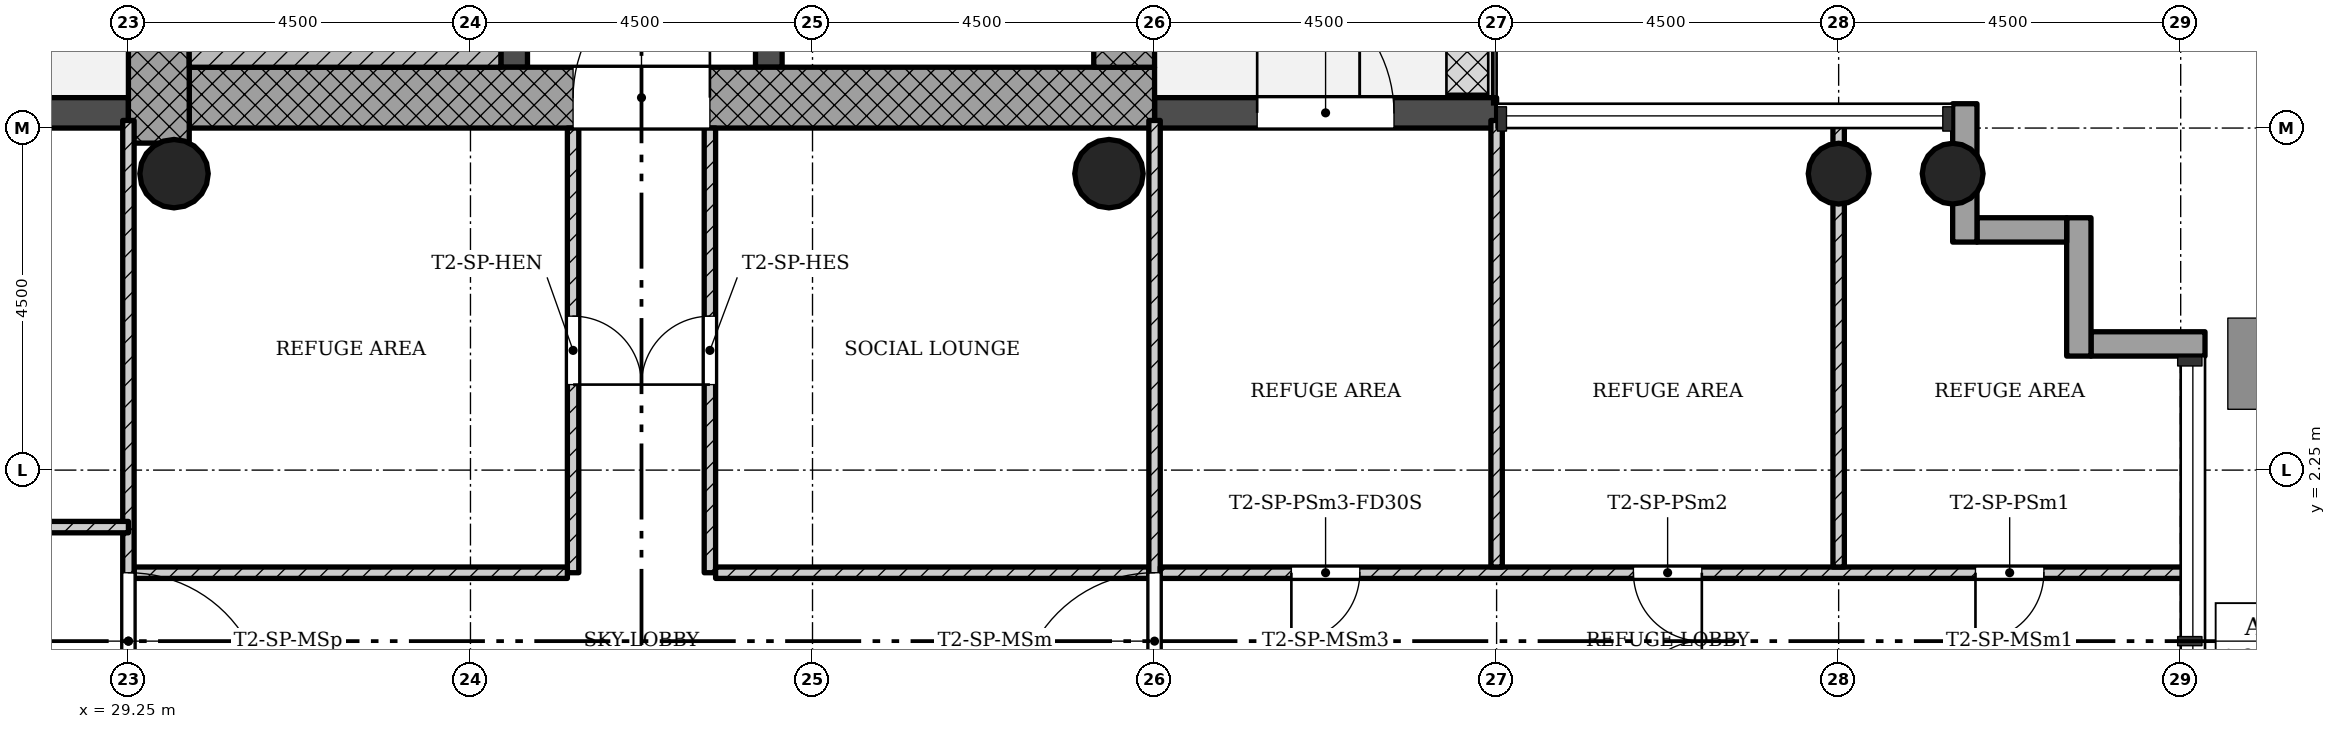
"""IFC4 building model, lengths in metres.
Left out: names, types, materials, properties, quantities, classifications, styles, units other than length and angle.
Written with IfcOpenShell. Run it as: python <this file> out.ifc"""

import sys

from ifc_helpers import new_model, si_unit, direction, frame, frame_2d, origin, origin_2d, place, context, subcontext, project, spatial, rectangle, hollow_circle, extrude, element, fill, save


model = new_model("IFC4")
c1 = context("Model", 3, precision=1e-05, world=origin(), true_north=direction((0.0, 1.0)))
c2 = subcontext(c1, "Body", "Model", "MODEL_VIEW")
j1 = project(units=[si_unit("LENGTHUNIT", "METRE"), si_unit("PLANEANGLEUNIT", "RADIAN")], contexts=[c1])
p1 = place(None, origin())
s1 = spatial("IfcSite", under=j1, at=p1, CompositionType="ELEMENT")
p2 = place(p1, origin())
s2 = spatial("IfcBuilding", under=s1, at=p2, CompositionType="ELEMENT")
p3 = place(p2, frame((0.0, 0.0, 128.7)))
s3 = spatial("IfcBuildingStorey", under=s2, at=p3, CompositionType="ELEMENT", Elevation=128.7)
p4 = place(p3, frame((30.05, 7.15, 0.0), z_axis=(0.0, 0.0, 1.0), x_axis=(1.0, 0.0, 0.0)))
e1 = element("IfcWall", 1, at=p4, inside=s3, PredefinedType="SHEAR", context=c2, shape_type="SweptSolid", body=[
    extrude(rectangle(XDim=12.7, YDim=0.8, at=frame_2d((6.35, 0.0))), origin(), (0.0, 0.0, 1.0), 5.0),
])
p5 = place(p4, frame((5.05, 0.0, 0.0)))
e2 = element("IfcOpeningElement", 2, at=p5, cuts=e1, PredefinedType="OPENING", context=c2, shape_type="SweptSolid", body=[
    extrude(rectangle(XDim=1.8, YDim=2.1, at=frame_2d((0.9, 1.05))), frame((0.0, 0.41, 0.0), z_axis=(0.0, -1.0, 0.0), x_axis=(1.0, 0.0, 0.0)), (0.0, 0.0, 1.0), 0.82),
])
p6 = place(p3, frame((42.35, 7.55, 0.0), z_axis=(0.0, 0.0, 1.0), x_axis=(0.0, 1.0, 0.0)))
e3 = element("IfcWall", 3, at=p6, inside=s3, PredefinedType="SHEAR", context=c2, shape_type="SweptSolid", body=[
    extrude(rectangle(XDim=8.2, YDim=0.8, at=frame_2d((4.1, 0.0))), origin(), (0.0, 0.0, 1.0), 5.0),
])
p7 = place(p3, frame((29.65, 15.348, 0.0), z_axis=(0.0, 0.0, 1.0), x_axis=(0.0, -1.0, 0.0)))
e4 = element("IfcWall", 4, at=p7, inside=s3, PredefinedType="SHEAR", context=c2, shape_type="SweptSolid", body=[
    extrude(rectangle(XDim=8.796, YDim=0.8, at=frame_2d((4.398, 0.0))), origin(), (0.0, 0.0, 1.0), 5.0),
])
p8 = place(p3, frame((34.325, 7.55, 0.0), z_axis=(0.0, 0.0, 1.0), x_axis=(0.0, 1.0, 0.0)))
e5 = element("IfcWall", 5, at=p8, inside=s3, PredefinedType="SHEAR", context=c2, shape_type="SweptSolid", body=[
    extrude(rectangle(XDim=7.4, YDim=0.35, at=frame_2d((3.7, 0.0))), origin(), (0.0, 0.0, 1.0), 5.0),
])
p9 = place(p8, frame((0.85, 0.0, 0.0)))
e6 = element("IfcOpeningElement", 6, at=p9, cuts=e5, PredefinedType="OPENING", context=c2, shape_type="SweptSolid", body=[
    extrude(rectangle(XDim=0.9, YDim=2.1, at=frame_2d((0.45, 1.05))), frame((0.0, 0.185, 0.0), z_axis=(0.0, -1.0, 0.0), x_axis=(1.0, 0.0, 0.0)), (0.0, 0.0, 1.0), 0.37),
])
p10 = place(p3, frame((37.675, 7.55, 0.0), z_axis=(0.0, 0.0, 1.0), x_axis=(0.0, 1.0, 0.0)))
e7 = element("IfcWall", 7, at=p10, inside=s3, PredefinedType="SHEAR", context=c2, shape_type="SweptSolid", body=[
    extrude(rectangle(XDim=7.4, YDim=0.35, at=frame_2d((3.7, 0.0))), origin(), (0.0, 0.0, 1.0), 5.0),
])
p11 = place(p10, frame((0.95, 0.0, 0.0)))
e8 = element("IfcOpeningElement", 8, at=p11, cuts=e7, PredefinedType="OPENING", context=c2, shape_type="SweptSolid", body=[
    extrude(rectangle(XDim=1.1, YDim=2.1, at=frame_2d((0.55, 1.05))), frame((0.0, 0.185, 0.0), z_axis=(0.0, -1.0, 0.0), x_axis=(1.0, 0.0, 0.0)), (0.0, 0.0, 1.0), 0.37),
])
p12 = place(p10, frame((3.15, 0.0, 0.0)))
e9 = element("IfcOpeningElement", 9, at=p12, cuts=e7, PredefinedType="OPENING", context=c2, shape_type="SweptSolid", body=[
    extrude(rectangle(XDim=1.1, YDim=2.1, at=frame_2d((0.55, 1.05))), frame((0.0, 0.185, 0.0), z_axis=(0.0, -1.0, 0.0), x_axis=(1.0, 0.0, 0.0)), (0.0, 0.0, 1.0), 0.37),
])
p13 = place(p10, frame((5.35, 0.0, 0.0)))
e10 = element("IfcOpeningElement", 10, at=p13, cuts=e7, PredefinedType="OPENING", context=c2, shape_type="SweptSolid", body=[
    extrude(rectangle(XDim=1.1, YDim=2.1, at=frame_2d((0.55, 1.05))), frame((0.0, 0.185, 0.0), z_axis=(0.0, -1.0, 0.0), x_axis=(1.0, 0.0, 0.0)), (0.0, 0.0, 1.0), 0.37),
])
for number, where, z_axis, x_axis in (
    (11, (51.75, 6.15, 0.0), (0.0, 0.0, 1.0), (1.0, 0.0, 0.0)),
    (12, (53.25, 6.15, 0.0), (0.0, 0.0, 1.0), (1.0, 0.0, 0.0)),
):
    element("IfcColumn", number, at=place(p3, frame(where, z_axis=z_axis, x_axis=x_axis)), inside=s3, PredefinedType="COLUMN", context=c2, shape_type="SweptSolid", body=[
        extrude(hollow_circle(Radius=0.4, WallThickness=0.028, at=origin_2d()), origin(), (0.0, 0.0, 1.0), 5.0),
    ])
for number, where, z_axis, x_axis in (
    (13, (42.15, 6.15, 0.0), (0.0, 0.0, 1.0), (1.0, 0.0, 0.0)),
    (14, (29.85, 6.15, 0.0), (0.0, 0.0, 1.0), (1.0, 0.0, 0.0)),
):
    element("IfcColumn", number, at=place(p3, frame(where, z_axis=z_axis, x_axis=x_axis)), inside=s3, PredefinedType="COLUMN", context=c2, shape_type="SweptSolid", body=[
        extrude(hollow_circle(Radius=0.45, WallThickness=0.032, at=origin_2d()), origin(), (0.0, 0.0, 1.0), 5.0),
    ])
p14 = place(p3, frame((56.57, 3.91, -0.3), z_axis=(0.0, 0.0, 1.0), x_axis=(-1.0, 0.0, 0.0)))
e15 = element("IfcWall", 15, at=p14, inside=s3, PredefinedType="STANDARD", context=c2, shape_type="SweptSolid", body=[
    extrude(rectangle(XDim=1.5, YDim=0.32, at=frame_2d((0.75, 0.0))), origin(), (0.0, 0.0, 1.0), 5.0),
])
p15 = place(p3, frame((54.91, 3.75, -0.3), z_axis=(0.0, 0.0, 1.0), x_axis=(0.0, 1.0, 0.0)))
e16 = element("IfcWall", 16, at=p15, inside=s3, PredefinedType="STANDARD", context=c2, shape_type="SweptSolid", body=[
    extrude(rectangle(XDim=1.82, YDim=0.32, at=frame_2d((0.91, 0.0))), origin(), (0.0, 0.0, 1.0), 5.0),
])
p16 = place(p3, frame((54.75, 5.41, -0.3), z_axis=(0.0, 0.0, 1.0), x_axis=(-1.0, 0.0, 0.0)))
e17 = element("IfcWall", 17, at=p16, inside=s3, PredefinedType="STANDARD", context=c2, shape_type="SweptSolid", body=[
    extrude(rectangle(XDim=1.18, YDim=0.32, at=frame_2d((0.59, 0.0))), origin(), (0.0, 0.0, 1.0), 5.0),
])
p17 = place(p3, frame((53.41, 5.25, -0.3), z_axis=(0.0, 0.0, 1.0), x_axis=(0.0, 1.0, 0.0)))
e18 = element("IfcWall", 18, at=p17, inside=s3, PredefinedType="STANDARD", context=c2, shape_type="SweptSolid", body=[
    extrude(rectangle(XDim=1.82, YDim=0.32, at=frame_2d((0.91, 0.0))), origin(), (0.0, 0.0, 1.0), 5.0),
])
p18 = place(p3, frame((47.25, 6.95, -0.02), z_axis=(0.0, 0.0, 1.0), x_axis=(-1.0, 0.0, 0.0)))
e19 = element("IfcWall", 19, at=p18, inside=s3, PredefinedType="STANDARD", context=c2, shape_type="SweptSolid", body=[
    extrude(rectangle(XDim=4.5, YDim=0.4, at=frame_2d((2.25, 0.0))), origin(), (0.0, 0.0, 1.0), 4.72),
])
p19 = place(p18, frame((1.35, 0.0, 0.02)))
e20 = element("IfcOpeningElement", 20, at=p19, cuts=e19, PredefinedType="OPENING", context=c2, shape_type="SweptSolid", body=[
    extrude(rectangle(XDim=1.8, YDim=2.1, at=frame_2d((0.9, 1.05))), frame((0.0, 0.21, 0.0), z_axis=(0.0, -1.0, 0.0), x_axis=(1.0, 0.0, 0.0)), (0.0, 0.0, 1.0), 0.42),
])
p20 = place(p3, frame((29.25, 6.95, -0.02), z_axis=(0.0, 0.0, 1.0), x_axis=(-1.0, 0.0, 0.0)))
e21 = element("IfcWall", 21, at=p20, inside=s3, PredefinedType="STANDARD", context=c2, shape_type="SweptSolid", body=[
    extrude(rectangle(XDim=4.5, YDim=0.4, at=frame_2d((2.25, 0.0))), origin(), (0.0, 0.0, 1.0), 4.72),
])
p21 = place(p20, frame((1.35, 0.0, 0.02)))
e22 = element("IfcOpeningElement", 22, at=p21, cuts=e21, PredefinedType="OPENING", context=c2, shape_type="SweptSolid", body=[
    extrude(rectangle(XDim=1.8, YDim=2.1, at=frame_2d((0.9, 1.05))), frame((0.0, 0.21, 0.0), z_axis=(0.0, -1.0, 0.0), x_axis=(1.0, 0.0, 0.0)), (0.0, 0.0, 1.0), 0.42),
])
p22 = place(p3, frame((35.1, 0.9, 0.0), z_axis=(0.0, 0.0, 1.0), x_axis=(0.0, 1.0, 0.0)))
e23 = element("IfcWall", 23, at=p22, inside=s3, PredefinedType="PARTITIONING", context=c2, shape_type="SweptSolid", body=[
    extrude(rectangle(XDim=5.85, YDim=0.15, at=frame_2d((2.925, 0.0))), origin(), (0.0, 0.0, 1.0), 4.58),
])
p23 = place(p22, frame((2.475, 0.0, 0.0)))
e24 = element("IfcOpeningElement", 24, at=p23, cuts=e23, PredefinedType="OPENING", context=c2, shape_type="SweptSolid", body=[
    extrude(rectangle(XDim=0.9, YDim=2.1, at=frame_2d((0.45, 1.05))), frame((0.0, 0.085, 0.0), z_axis=(0.0, -1.0, 0.0), x_axis=(1.0, 0.0, 0.0)), (0.0, 0.0, 1.0), 0.17),
])
p24 = place(p3, frame((35.025, 0.9, 0.0), z_axis=(0.0, 0.0, 1.0), x_axis=(-1.0, 0.0, 0.0)))
e25 = element("IfcWall", 25, at=p24, inside=s3, PredefinedType="PARTITIONING", context=c2, shape_type="SweptSolid", body=[
    extrude(rectangle(XDim=5.7, YDim=0.15, at=frame_2d((2.85, 0.0))), origin(), (0.0, 0.0, 1.0), 4.58),
])
p25 = place(p3, frame((36.9, 0.9, 0.0), z_axis=(0.0, 0.0, 1.0), x_axis=(0.0, 1.0, 0.0)))
e26 = element("IfcWall", 26, at=p25, inside=s3, PredefinedType="PARTITIONING", context=c2, shape_type="SweptSolid", body=[
    extrude(rectangle(XDim=5.85, YDim=0.15, at=frame_2d((2.925, 0.0))), origin(), (0.0, 0.0, 1.0), 4.58),
])
p26 = place(p25, frame((2.475, 0.0, 0.0)))
e27 = element("IfcOpeningElement", 27, at=p26, cuts=e26, PredefinedType="OPENING", context=c2, shape_type="SweptSolid", body=[
    extrude(rectangle(XDim=0.9, YDim=2.1, at=frame_2d((0.45, 1.05))), frame((0.0, 0.085, 0.0), z_axis=(0.0, -1.0, 0.0), x_axis=(1.0, 0.0, 0.0)), (0.0, 0.0, 1.0), 0.17),
])
p27 = place(p3, frame((42.675, 0.9, 0.0), z_axis=(0.0, 0.0, 1.0), x_axis=(-1.0, 0.0, 0.0)))
e28 = element("IfcWall", 28, at=p27, inside=s3, PredefinedType="PARTITIONING", context=c2, shape_type="SweptSolid", body=[
    extrude(rectangle(XDim=5.7, YDim=0.15, at=frame_2d((2.85, 0.0))), origin(), (0.0, 0.0, 1.0), 4.58),
])
p28 = place(p3, frame((29.25, -6.85, 0.0), z_axis=(0.0, 0.0, 1.0), x_axis=(0.0, 1.0, 0.0)))
e29 = element("IfcWall", 29, at=p28, inside=s3, PredefinedType="PARTITIONING", context=c2, shape_type="SweptSolid", body=[
    extrude(rectangle(XDim=13.7, YDim=0.15, at=frame_2d((6.85, 0.0))), origin(), (0.0, 0.0, 1.0), 4.58),
])
p29 = place(p28, frame((5.95, 0.0, 0.0)))
e30 = element("IfcOpeningElement", 30, at=p29, cuts=e29, PredefinedType="OPENING", context=c2, shape_type="SweptSolid", body=[
    extrude(rectangle(XDim=1.8, YDim=2.1, at=frame_2d((0.9, 1.05))), frame((0.0, 0.085, 0.0), z_axis=(0.0, -1.0, 0.0), x_axis=(1.0, 0.0, 0.0)), (0.0, 0.0, 1.0), 0.17),
])
p30 = place(p3, frame((29.25, 1.5, 0.0), z_axis=(0.0, 0.0, 1.0), x_axis=(-1.0, 0.0, 0.0)))
e31 = element("IfcWall", 31, at=p30, inside=s3, PredefinedType="PARTITIONING", context=c2, shape_type="SweptSolid", body=[
    extrude(rectangle(XDim=13.6, YDim=0.15, at=frame_2d((6.8, 0.0))), origin(), (0.0, 0.0, 1.0), 4.58),
])
p31 = place(p30, frame((1.8, 0.0, 0.0)))
e32 = element("IfcOpeningElement", 32, at=p31, cuts=e31, PredefinedType="OPENING", context=c2, shape_type="SweptSolid", body=[
    extrude(rectangle(XDim=0.9, YDim=2.1, at=frame_2d((0.45, 1.05))), frame((0.0, 0.085, 0.0), z_axis=(0.0, -1.0, 0.0), x_axis=(1.0, 0.0, 0.0)), (0.0, 0.0, 1.0), 0.17),
])
p32 = place(p30, frame((6.3, 0.0, 0.0)))
e33 = element("IfcOpeningElement", 33, at=p32, cuts=e31, PredefinedType="OPENING", context=c2, shape_type="SweptSolid", body=[
    extrude(rectangle(XDim=0.9, YDim=2.1, at=frame_2d((0.45, 1.05))), frame((0.0, 0.085, 0.0), z_axis=(0.0, -1.0, 0.0), x_axis=(1.0, 0.0, 0.0)), (0.0, 0.0, 1.0), 0.17),
])
p33 = place(p30, frame((10.8, 0.0, 0.0)))
e34 = element("IfcOpeningElement", 34, at=p33, cuts=e31, PredefinedType="OPENING", context=c2, shape_type="SweptSolid", body=[
    extrude(rectangle(XDim=0.9, YDim=2.1, at=frame_2d((0.45, 1.05))), frame((0.0, 0.085, 0.0), z_axis=(0.0, -1.0, 0.0), x_axis=(1.0, 0.0, 0.0)), (0.0, 0.0, 1.0), 0.17),
])
p34 = place(p3, frame((42.75, -6.85, 0.0), z_axis=(0.0, 0.0, 1.0), x_axis=(0.0, 1.0, 0.0)))
e35 = element("IfcWall", 35, at=p34, inside=s3, PredefinedType="PARTITIONING", context=c2, shape_type="SweptSolid", body=[
    extrude(rectangle(XDim=13.7, YDim=0.15, at=frame_2d((6.85, 0.0))), origin(), (0.0, 0.0, 1.0), 4.58),
])
p35 = place(p34, frame((5.95, 0.0, 0.0)))
e36 = element("IfcOpeningElement", 36, at=p35, cuts=e35, PredefinedType="OPENING", context=c2, shape_type="SweptSolid", body=[
    extrude(rectangle(XDim=1.8, YDim=2.1, at=frame_2d((0.9, 1.05))), frame((0.0, 0.085, 0.0), z_axis=(0.0, -1.0, 0.0), x_axis=(1.0, 0.0, 0.0)), (0.0, 0.0, 1.0), 0.17),
])
p36 = place(p3, frame((56.35, 0.9, 0.0), z_axis=(0.0, 0.0, 1.0), x_axis=(-1.0, 0.0, 0.0)))
e37 = element("IfcWall", 37, at=p36, inside=s3, PredefinedType="PARTITIONING", context=c2, shape_type="SweptSolid", body=[
    extrude(rectangle(XDim=13.525, YDim=0.15, at=frame_2d((6.763, 0.0))), origin(), (0.0, 0.0, 1.0), 4.58),
])
p37 = place(p36, frame((1.9, 0.0, 0.0)))
e38 = element("IfcOpeningElement", 38, at=p37, cuts=e37, PredefinedType="OPENING", context=c2, shape_type="SweptSolid", body=[
    extrude(rectangle(XDim=0.9, YDim=2.1, at=frame_2d((0.45, 1.05))), frame((0.0, 0.085, 0.0), z_axis=(0.0, -1.0, 0.0), x_axis=(1.0, 0.0, 0.0)), (0.0, 0.0, 1.0), 0.17),
])
p38 = place(p36, frame((6.4, 0.0, 0.0)))
e39 = element("IfcOpeningElement", 39, at=p38, cuts=e37, PredefinedType="OPENING", context=c2, shape_type="SweptSolid", body=[
    extrude(rectangle(XDim=0.9, YDim=2.1, at=frame_2d((0.45, 1.05))), frame((0.0, 0.085, 0.0), z_axis=(0.0, -1.0, 0.0), x_axis=(1.0, 0.0, 0.0)), (0.0, 0.0, 1.0), 0.17),
])
p39 = place(p36, frame((10.9, 0.0, 0.0)))
e40 = element("IfcOpeningElement", 40, at=p39, cuts=e37, PredefinedType="OPENING", context=c2, shape_type="SweptSolid", body=[
    extrude(rectangle(XDim=0.9, YDim=2.1, at=frame_2d((0.45, 1.05))), frame((0.0, 0.085, 0.0), z_axis=(0.0, -1.0, 0.0), x_axis=(1.0, 0.0, 0.0)), (0.0, 0.0, 1.0), 0.17),
])
for number, where, z_axis, x_axis in (
    (41, (51.75, 0.975, 0.0), (0.0, 0.0, 1.0), (0.0, 1.0, 0.0)),
    (42, (47.25, 0.975, 0.0), (0.0, 0.0, 1.0), (0.0, 1.0, 0.0)),
):
    element("IfcWall", number, at=place(p3, frame(where, z_axis=z_axis, x_axis=x_axis)), inside=s3, PredefinedType="PARTITIONING", context=c2, shape_type="SweptSolid", body=[
        extrude(rectangle(XDim=5.875, YDim=0.15, at=frame_2d((2.938, 0.0))), origin(), (0.0, 0.0, 1.0), 4.58),
    ])
p40 = place(p3, frame((34.15, 7.75, 0.0), z_axis=(0.0, 0.0, 1.0), x_axis=(-1.0, 0.0, 0.0)))
e43 = element("IfcWall", 43, at=p40, inside=s3, PredefinedType="SHEAR", context=c2, shape_type="SweptSolid", body=[
    extrude(rectangle(XDim=4.1, YDim=0.4, at=frame_2d((2.05, 0.0))), origin(), (0.0, 0.0, 1.0), 5.0),
])
p41 = place(p19, origin())
e44 = element("IfcDoor", 44, at=p41, inside=s3, OperationType="SINGLE_SWING_RIGHT", PredefinedType="DOOR", context=c2, shape_type="SweptSolid", body=[
    extrude(rectangle(XDim=1.8, YDim=2.1, at=frame_2d((0.9, 1.05))), frame((0.0, 0.025, 0.0), z_axis=(0.0, -1.0, 0.0), x_axis=(1.0, 0.0, 0.0)), (0.0, 0.0, 1.0), 0.05),
])
fill(e20, e44)
p42 = place(p23, origin())
e45 = element("IfcDoor", 45, at=p42, inside=s3, OperationType="SINGLE_SWING_LEFT", PredefinedType="DOOR", context=c2, shape_type="SweptSolid", body=[
    extrude(rectangle(XDim=0.9, YDim=2.1, at=frame_2d((0.45, 1.05))), frame((0.0, 0.025, 0.0), z_axis=(0.0, -1.0, 0.0), x_axis=(1.0, 0.0, 0.0)), (0.0, 0.0, 1.0), 0.05),
])
fill(e24, e45)
p43 = place(p26, origin())
e46 = element("IfcDoor", 46, at=p43, inside=s3, OperationType="SINGLE_SWING_RIGHT", PredefinedType="DOOR", context=c2, shape_type="SweptSolid", body=[
    extrude(rectangle(XDim=0.9, YDim=2.1, at=frame_2d((0.45, 1.05))), frame((0.0, 0.025, 0.0), z_axis=(0.0, -1.0, 0.0), x_axis=(1.0, 0.0, 0.0)), (0.0, 0.0, 1.0), 0.05),
])
fill(e27, e46)
p44 = place(p29, origin())
e47 = element("IfcDoor", 47, at=p44, inside=s3, OperationType="SINGLE_SWING_LEFT", PredefinedType="DOOR", context=c2, shape_type="SweptSolid", body=[
    extrude(rectangle(XDim=1.8, YDim=2.1, at=frame_2d((0.9, 1.05))), frame((0.0, 0.025, 0.0), z_axis=(0.0, -1.0, 0.0), x_axis=(1.0, 0.0, 0.0)), (0.0, 0.0, 1.0), 0.05),
])
fill(e30, e47)
p45 = place(p35, origin())
e48 = element("IfcDoor", 48, at=p45, inside=s3, OperationType="SINGLE_SWING_RIGHT", PredefinedType="DOOR", context=c2, shape_type="SweptSolid", body=[
    extrude(rectangle(XDim=1.8, YDim=2.1, at=frame_2d((0.9, 1.05))), frame((0.0, 0.025, 0.0), z_axis=(0.0, -1.0, 0.0), x_axis=(1.0, 0.0, 0.0)), (0.0, 0.0, 1.0), 0.05),
])
fill(e36, e48)
p46 = place(p37, origin())
e49 = element("IfcDoor", 49, at=p46, inside=s3, OperationType="SINGLE_SWING_LEFT", PredefinedType="DOOR", context=c2, shape_type="SweptSolid", body=[
    extrude(rectangle(XDim=0.9, YDim=2.1, at=frame_2d((0.45, 1.05))), frame((0.0, 0.025, 0.0), z_axis=(0.0, -1.0, 0.0), x_axis=(1.0, 0.0, 0.0)), (0.0, 0.0, 1.0), 0.05),
])
fill(e38, e49)
p47 = place(p38, origin())
e50 = element("IfcDoor", 50, at=p47, inside=s3, OperationType="SINGLE_SWING_RIGHT", PredefinedType="DOOR", context=c2, shape_type="SweptSolid", body=[
    extrude(rectangle(XDim=0.9, YDim=2.1, at=frame_2d((0.45, 1.05))), frame((0.0, 0.025, 0.0), z_axis=(0.0, -1.0, 0.0), x_axis=(1.0, 0.0, 0.0)), (0.0, 0.0, 1.0), 0.05),
])
fill(e39, e50)
p48 = place(p39, origin())
e51 = element("IfcDoor", 51, at=p48, inside=s3, OperationType="SINGLE_SWING_LEFT", PredefinedType="DOOR", context=c2, shape_type="SweptSolid", body=[
    extrude(rectangle(XDim=0.9, YDim=2.1, at=frame_2d((0.45, 1.05))), frame((0.0, 0.025, 0.0), z_axis=(0.0, -1.0, 0.0), x_axis=(1.0, 0.0, 0.0)), (0.0, 0.0, 1.0), 0.05),
])
fill(e40, e51)
p49 = place(p5, origin())
e52 = element("IfcDoor", 52, at=p49, inside=s3, OperationType="SINGLE_SWING_LEFT", PredefinedType="DOOR", context=c2, shape_type="SweptSolid", body=[
    extrude(rectangle(XDim=1.8, YDim=2.1, at=frame_2d((0.9, 1.05))), frame((0.0, 0.025, 0.0), z_axis=(0.0, -1.0, 0.0), x_axis=(1.0, 0.0, 0.0)), (0.0, 0.0, 1.0), 0.05),
])
fill(e2, e52)
save(model, sys.argv[1])
